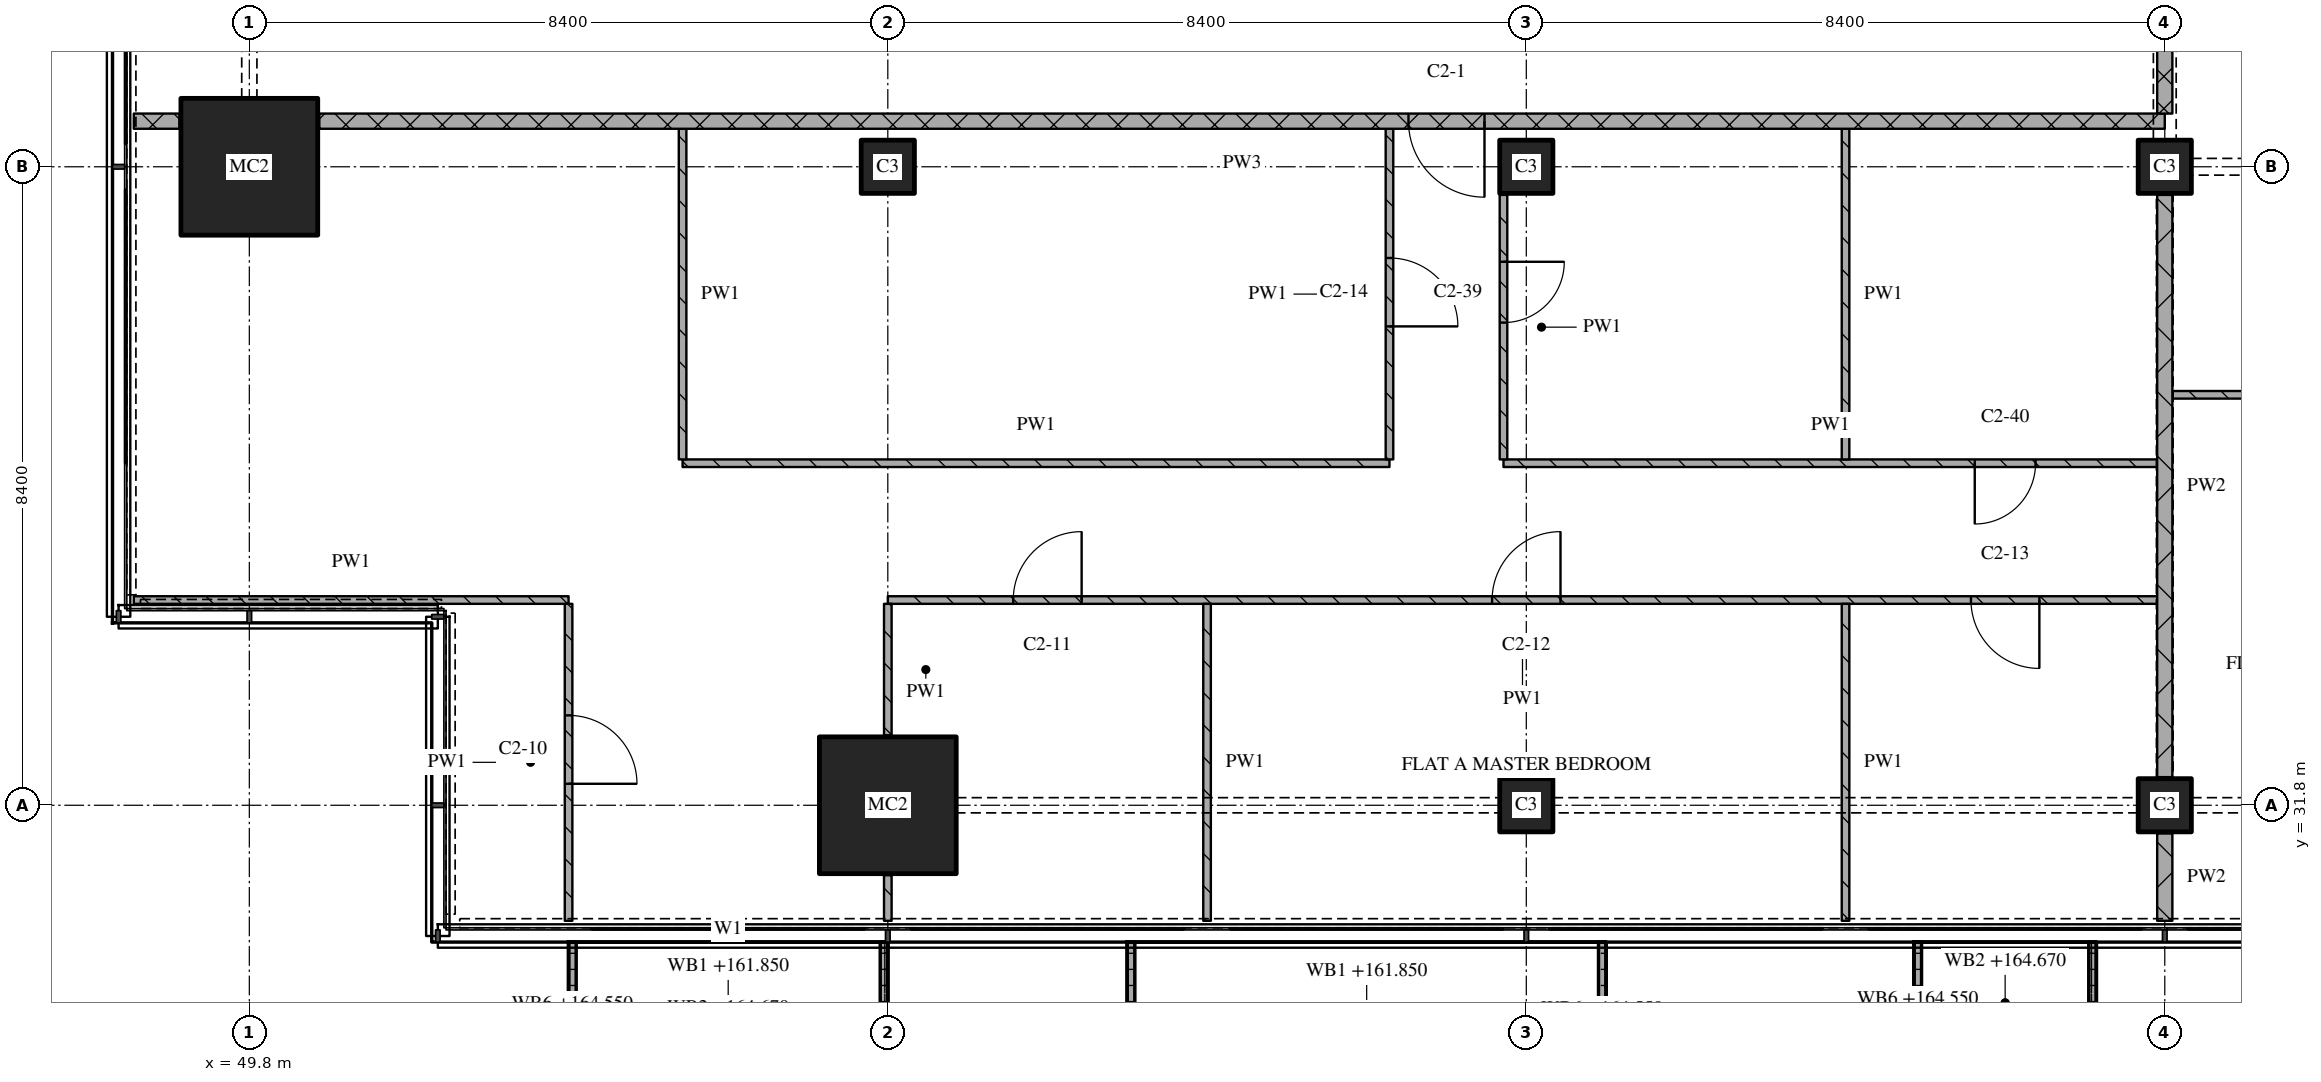
"""IFC4 building model, lengths in metres.
Left out: names, types, materials, properties, quantities, classifications, styles, units other than length and angle.
Written with IfcOpenShell. Run it as: python <this file> out.ifc"""

import sys

from ifc_helpers import new_model, si_unit, direction, frame, frame_2d, origin, origin_2d, place, context, subcontext, project, spatial, polyline, rectangle, outline, extrude, element, fill, save


model = new_model("IFC4")
c1 = context("Model", 3, precision=1e-05, world=origin(), true_north=direction((0.0, 1.0)))
c2 = subcontext(c1, "Body", "Model", "MODEL_VIEW")
j1 = project(units=[si_unit("LENGTHUNIT", "METRE"), si_unit("PLANEANGLEUNIT", "RADIAN")], contexts=[c1])
p1 = place(None, origin())
s1 = spatial("IfcSite", under=j1, at=p1, CompositionType="ELEMENT")
p2 = place(p1, origin())
s2 = spatial("IfcBuilding", under=s1, at=p2, CompositionType="ELEMENT")
p3 = place(p2, frame((0.0, 0.0, 161.85)))
s3 = spatial("IfcBuildingStorey", under=s2, at=p3, CompositionType="ELEMENT", Elevation=161.85)
for number, where, z_axis, x_axis in (
    (1, (49.8, 40.2, 0.0), (0.0, 0.0, 1.0), (1.0, 0.0, 0.0)),
    (2, (58.2, 31.8, 0.0), (0.0, 0.0, 1.0), (1.0, 0.0, 0.0)),
):
    element("IfcColumn", number, at=place(p3, frame(where, z_axis=z_axis, x_axis=x_axis)), inside=s3, PredefinedType="COLUMN", context=c2, shape_type="SweptSolid", body=[
        extrude(rectangle(XDim=1.8, YDim=1.8, at=origin_2d()), origin(), (0.0, 0.0, 1.0), 3.6),
    ])
for number, where, z_axis, x_axis in (
    (3, (58.2, 40.2, 0.0), (0.0, 0.0, 1.0), (1.0, 0.0, 0.0)),
    (4, (66.6, 31.8, 0.0), (0.0, 0.0, 1.0), (1.0, 0.0, 0.0)),
    (5, (66.6, 40.2, 0.0), (0.0, 0.0, 1.0), (1.0, 0.0, 0.0)),
    (6, (75.0, 31.8, 0.0), (0.0, 0.0, 1.0), (1.0, 0.0, 0.0)),
    (7, (75.0, 40.2, 0.0), (0.0, 0.0, 1.0), (1.0, 0.0, 0.0)),
):
    element("IfcColumn", number, at=place(p3, frame(where, z_axis=z_axis, x_axis=x_axis)), inside=s3, PredefinedType="COLUMN", context=c2, shape_type="SweptSolid", body=[
        extrude(rectangle(XDim=0.7, YDim=0.7, at=origin_2d()), origin(), (0.0, 0.0, 1.0), 3.6),
    ])
p4 = place(p3, origin())
e8 = element("IfcWall", 8, at=p4, inside=s3, PredefinedType="SOLIDWALL", context=c2, shape_type="SweptSolid", body=[
    extrude(outline(polyline([(54.0, 30.0), (54.1, 30.0), (54.1, 28.367), (58.1, 28.367), (58.1, 30.0), (58.2, 30.0), (58.2, 28.267), (54.0, 28.267), (54.0, 30.0)])), origin(), (0.0, 0.0, 1.0), 1.0),
])
p5 = place(p3, origin())
e9 = element("IfcWall", 9, at=p5, inside=s3, PredefinedType="SOLIDWALL", context=c2, shape_type="SweptSolid", body=[
    extrude(outline(polyline([(61.35, 30.0), (61.45, 30.0), (61.45, 28.233), (67.55, 28.233), (67.55, 30.0), (67.65, 30.0), (67.65, 28.133), (61.35, 28.133), (61.35, 30.0)])), origin(), (0.0, 0.0, 1.0), 1.0),
])
p6 = place(p3, origin())
e10 = element("IfcWall", 10, at=p6, inside=s3, PredefinedType="SOLIDWALL", context=c2, shape_type="SweptSolid", body=[
    extrude(outline(polyline([(71.7, 30.0), (71.8, 30.0), (71.8, 28.5), (74.0, 28.5), (74.0, 30.0), (74.1, 30.0), (74.1, 28.4), (71.7, 28.4), (71.7, 30.0)])), origin(), (0.0, 0.0, 1.0), 1.0),
])
p7 = place(p3, frame((48.28, 34.5, 0.0), z_axis=(0.0, 0.0, 1.0), x_axis=(1.0, 0.0, 0.0)))
e11 = element("IfcWall", 11, at=p7, inside=s3, PredefinedType="PARTITIONING", context=c2, shape_type="SweptSolid", body=[
    extrude(rectangle(XDim=5.72, YDim=0.1, at=frame_2d((2.86, 0.0))), origin(), (0.0, 0.0, 1.0), 3.32),
])
p8 = place(p3, frame((74.9, 34.5, 0.0), z_axis=(0.0, 0.0, 1.0), x_axis=(-1.0, 0.0, 0.0)))
e12 = element("IfcWall", 12, at=p8, inside=s3, PredefinedType="PARTITIONING", context=c2, shape_type="SweptSolid", body=[
    extrude(rectangle(XDim=16.7, YDim=0.1, at=frame_2d((8.35, 0.0))), origin(), (0.0, 0.0, 1.0), 3.32),
])
p9 = place(p8, frame((1.55, 0.0, 0.0)))
e13 = element("IfcOpeningElement", 13, at=p9, cuts=e12, PredefinedType="OPENING", context=c2, shape_type="SweptSolid", body=[
    extrude(rectangle(XDim=0.9, YDim=2.1, at=frame_2d((0.45, 1.05))), frame((0.0, 0.06, 0.0), z_axis=(0.0, -1.0, 0.0), x_axis=(1.0, 0.0, 0.0)), (0.0, 0.0, 1.0), 0.12),
])
p10 = place(p8, frame((7.85, 0.0, 0.0)))
e14 = element("IfcOpeningElement", 14, at=p10, cuts=e12, PredefinedType="OPENING", context=c2, shape_type="SweptSolid", body=[
    extrude(rectangle(XDim=0.9, YDim=2.1, at=frame_2d((0.45, 1.05))), frame((0.0, 0.06, 0.0), z_axis=(0.0, -1.0, 0.0), x_axis=(1.0, 0.0, 0.0)), (0.0, 0.0, 1.0), 0.12),
])
p11 = place(p8, frame((14.15, 0.0, 0.0)))
e15 = element("IfcOpeningElement", 15, at=p11, cuts=e12, PredefinedType="OPENING", context=c2, shape_type="SweptSolid", body=[
    extrude(rectangle(XDim=0.9, YDim=2.1, at=frame_2d((0.45, 1.05))), frame((0.0, 0.06, 0.0), z_axis=(0.0, -1.0, 0.0), x_axis=(1.0, 0.0, 0.0)), (0.0, 0.0, 1.0), 0.12),
])
p12 = place(p3, frame((55.5, 36.3, 0.0), z_axis=(0.0, 0.0, 1.0), x_axis=(1.0, 0.0, 0.0)))
e16 = element("IfcWall", 16, at=p12, inside=s3, PredefinedType="PARTITIONING", context=c2, shape_type="SweptSolid", body=[
    extrude(rectangle(XDim=9.3, YDim=0.1, at=frame_2d((4.65, 0.0))), origin(), (0.0, 0.0, 1.0), 3.32),
])
p13 = place(p3, frame((66.3, 36.3, 0.0), z_axis=(0.0, 0.0, 1.0), x_axis=(1.0, 0.0, 0.0)))
e17 = element("IfcWall", 17, at=p13, inside=s3, PredefinedType="PARTITIONING", context=c2, shape_type="SweptSolid", body=[
    extrude(rectangle(XDim=8.6, YDim=0.1, at=frame_2d((4.3, 0.0))), origin(), (0.0, 0.0, 1.0), 3.32),
])
p14 = place(p13, frame((6.2, 0.0, 0.0)))
e18 = element("IfcOpeningElement", 18, at=p14, cuts=e17, PredefinedType="OPENING", context=c2, shape_type="SweptSolid", body=[
    extrude(rectangle(XDim=0.8, YDim=2.1, at=frame_2d((0.4, 1.05))), frame((0.0, 0.06, 0.0), z_axis=(0.0, -1.0, 0.0), x_axis=(1.0, 0.0, 0.0)), (0.0, 0.0, 1.0), 0.12),
])
p15 = place(p3, frame((75.1, 37.2, 0.0), z_axis=(0.0, 0.0, 1.0), x_axis=(1.0, 0.0, 0.0)))
e19 = element("IfcWall", 19, at=p15, inside=s3, PredefinedType="PARTITIONING", context=c2, shape_type="SweptSolid", body=[
    extrude(rectangle(XDim=11.3, YDim=0.1, at=frame_2d((5.65, 0.0))), origin(), (0.0, 0.0, 1.0), 3.32),
])
p16 = place(p15, frame((1.708, 0.0, 0.0)))
e20 = element("IfcOpeningElement", 20, at=p16, cuts=e19, PredefinedType="OPENING", context=c2, shape_type="SweptSolid", body=[
    extrude(rectangle(XDim=0.8, YDim=2.1, at=frame_2d((0.4, 1.05))), frame((0.0, 0.06, 0.0), z_axis=(0.0, -1.0, 0.0), x_axis=(1.0, 0.0, 0.0)), (0.0, 0.0, 1.0), 0.12),
])
p17 = place(p15, frame((6.125, 0.0, 0.0)))
e21 = element("IfcOpeningElement", 21, at=p17, cuts=e19, PredefinedType="OPENING", context=c2, shape_type="SweptSolid", body=[
    extrude(rectangle(XDim=0.8, YDim=2.1, at=frame_2d((0.4, 1.05))), frame((0.0, 0.06, 0.0), z_axis=(0.0, -1.0, 0.0), x_axis=(1.0, 0.0, 0.0)), (0.0, 0.0, 1.0), 0.12),
])
p18 = place(p15, frame((9.567, 0.0, 0.0)))
e22 = element("IfcOpeningElement", 22, at=p18, cuts=e19, PredefinedType="OPENING", context=c2, shape_type="SweptSolid", body=[
    extrude(rectangle(XDim=0.9, YDim=2.1, at=frame_2d((0.45, 1.05))), frame((0.0, 0.06, 0.0), z_axis=(0.0, -1.0, 0.0), x_axis=(1.0, 0.0, 0.0)), (0.0, 0.0, 1.0), 0.12),
])
p19 = place(p3, frame((48.28, 40.8, 0.0), z_axis=(0.0, 0.0, 1.0), x_axis=(1.0, 0.0, 0.0)))
e23 = element("IfcWall", 23, at=p19, inside=s3, PredefinedType="PARTITIONING", context=c2, shape_type="SweptSolid", body=[
    extrude(rectangle(XDim=0.6, YDim=0.2, at=frame_2d((0.3, 0.0))), origin(), (0.0, 0.0, 1.0), 3.32),
])
p20 = place(p3, frame((75.0, 40.8, 0.0), z_axis=(0.0, 0.0, 1.0), x_axis=(-1.0, 0.0, 0.0)))
e24 = element("IfcWall", 24, at=p20, inside=s3, PredefinedType="PARTITIONING", context=c2, shape_type="SweptSolid", body=[
    extrude(rectangle(XDim=24.28, YDim=0.2, at=frame_2d((12.14, 0.0))), origin(), (0.0, 0.0, 1.0), 3.32),
])
p21 = place(p20, frame((8.95, 0.0, 0.0)))
e25 = element("IfcOpeningElement", 25, at=p21, cuts=e24, PredefinedType="OPENING", context=c2, shape_type="SweptSolid", body=[
    extrude(rectangle(XDim=1.0, YDim=2.1, at=frame_2d((0.5, 1.05))), frame((0.0, 0.11, 0.0), z_axis=(0.0, -1.0, 0.0), x_axis=(1.0, 0.0, 0.0)), (0.0, 0.0, 1.0), 0.22),
])
p22 = place(p3, frame((54.0, 30.28, 0.0), z_axis=(0.0, 0.0, 1.0), x_axis=(0.0, 1.0, 0.0)))
e26 = element("IfcWall", 26, at=p22, inside=s3, PredefinedType="PARTITIONING", context=c2, shape_type="SweptSolid", body=[
    extrude(rectangle(XDim=4.17, YDim=0.1, at=frame_2d((2.085, 0.0))), origin(), (0.0, 0.0, 1.0), 3.32),
])
p23 = place(p22, frame((1.803, 0.0, 0.0)))
e27 = element("IfcOpeningElement", 27, at=p23, cuts=e26, PredefinedType="OPENING", context=c2, shape_type="SweptSolid", body=[
    extrude(rectangle(XDim=0.9, YDim=2.1, at=frame_2d((0.45, 1.05))), frame((0.0, 0.06, 0.0), z_axis=(0.0, -1.0, 0.0), x_axis=(1.0, 0.0, 0.0)), (0.0, 0.0, 1.0), 0.12),
])
p24 = place(p3, frame((55.5, 40.7, 0.0), z_axis=(0.0, 0.0, 1.0), x_axis=(0.0, -1.0, 0.0)))
e28 = element("IfcWall", 28, at=p24, inside=s3, PredefinedType="PARTITIONING", context=c2, shape_type="SweptSolid", body=[
    extrude(rectangle(XDim=4.35, YDim=0.1, at=frame_2d((2.175, 0.0))), origin(), (0.0, 0.0, 1.0), 3.32),
])
p25 = place(p3, frame((58.2, 30.88, 0.0), z_axis=(0.0, 0.0, 1.0), x_axis=(0.0, -1.0, 0.0)))
e29 = element("IfcWall", 29, at=p25, inside=s3, PredefinedType="PARTITIONING", context=c2, shape_type="SweptSolid", body=[
    extrude(rectangle(XDim=0.6, YDim=0.1, at=frame_2d((0.3, 0.0))), origin(), (0.0, 0.0, 1.0), 3.32),
])
p26 = place(p3, frame((58.2, 34.45, 0.0), z_axis=(0.0, 0.0, 1.0), x_axis=(0.0, -1.0, 0.0)))
e30 = element("IfcWall", 30, at=p26, inside=s3, PredefinedType="PARTITIONING", context=c2, shape_type="SweptSolid", body=[
    extrude(rectangle(XDim=1.73, YDim=0.1, at=frame_2d((0.865, 0.0))), origin(), (0.0, 0.0, 1.0), 3.32),
])
p27 = place(p3, frame((62.4, 34.45, 0.0), z_axis=(0.0, 0.0, 1.0), x_axis=(0.0, -1.0, 0.0)))
e31 = element("IfcWall", 31, at=p27, inside=s3, PredefinedType="PARTITIONING", context=c2, shape_type="SweptSolid", body=[
    extrude(rectangle(XDim=4.17, YDim=0.1, at=frame_2d((2.085, 0.0))), origin(), (0.0, 0.0, 1.0), 3.32),
])
p28 = place(p3, frame((64.8, 36.35, 0.0), z_axis=(0.0, 0.0, 1.0), x_axis=(0.0, 1.0, 0.0)))
e32 = element("IfcWall", 32, at=p28, inside=s3, PredefinedType="PARTITIONING", context=c2, shape_type="SweptSolid", body=[
    extrude(rectangle(XDim=4.35, YDim=0.1, at=frame_2d((2.175, 0.0))), origin(), (0.0, 0.0, 1.0), 3.32),
])
p29 = place(p28, frame((1.75, 0.0, 0.0)))
e33 = element("IfcOpeningElement", 33, at=p29, cuts=e32, PredefinedType="OPENING", context=c2, shape_type="SweptSolid", body=[
    extrude(rectangle(XDim=0.9, YDim=2.1, at=frame_2d((0.45, 1.05))), frame((0.0, 0.06, 0.0), z_axis=(0.0, -1.0, 0.0), x_axis=(1.0, 0.0, 0.0)), (0.0, 0.0, 1.0), 0.12),
])
p30 = place(p3, frame((66.3, 39.83, 0.0), z_axis=(0.0, 0.0, 1.0), x_axis=(0.0, -1.0, 0.0)))
e34 = element("IfcWall", 34, at=p30, inside=s3, PredefinedType="PARTITIONING", context=c2, shape_type="SweptSolid", body=[
    extrude(rectangle(XDim=3.48, YDim=0.1, at=frame_2d((1.74, 0.0))), origin(), (0.0, 0.0, 1.0), 3.32),
])
p31 = place(p30, frame((0.88, 0.0, 0.0)))
e35 = element("IfcOpeningElement", 35, at=p31, cuts=e34, PredefinedType="OPENING", context=c2, shape_type="SweptSolid", body=[
    extrude(rectangle(XDim=0.8, YDim=2.1, at=frame_2d((0.4, 1.05))), frame((0.0, 0.06, 0.0), z_axis=(0.0, -1.0, 0.0), x_axis=(1.0, 0.0, 0.0)), (0.0, 0.0, 1.0), 0.12),
])
p32 = place(p3, frame((70.8, 34.45, 0.0), z_axis=(0.0, 0.0, 1.0), x_axis=(0.0, -1.0, 0.0)))
e36 = element("IfcWall", 36, at=p32, inside=s3, PredefinedType="PARTITIONING", context=c2, shape_type="SweptSolid", body=[
    extrude(rectangle(XDim=4.17, YDim=0.1, at=frame_2d((2.085, 0.0))), origin(), (0.0, 0.0, 1.0), 3.32),
])
p33 = place(p3, frame((70.8, 40.7, 0.0), z_axis=(0.0, 0.0, 1.0), x_axis=(0.0, -1.0, 0.0)))
e37 = element("IfcWall", 37, at=p33, inside=s3, PredefinedType="PARTITIONING", context=c2, shape_type="SweptSolid", body=[
    extrude(rectangle(XDim=4.35, YDim=0.1, at=frame_2d((2.175, 0.0))), origin(), (0.0, 0.0, 1.0), 3.32),
])
p34 = place(p3, frame((75.0, 43.1, 0.0), z_axis=(0.0, 0.0, 1.0), x_axis=(0.0, -1.0, 0.0)))
e38 = element("IfcWall", 38, at=p34, inside=s3, PredefinedType="PARTITIONING", context=c2, shape_type="SweptSolid", body=[
    extrude(rectangle(XDim=2.2, YDim=0.2, at=frame_2d((1.1, 0.0))), origin(), (0.0, 0.0, 1.0), 2.43),
])
p35 = place(p3, frame((75.0, 31.43, 0.0), z_axis=(0.0, 0.0, 1.0), x_axis=(0.0, -1.0, 0.0)))
e39 = element("IfcWall", 39, at=p35, inside=s3, PredefinedType="PARTITIONING", context=c2, shape_type="SweptSolid", body=[
    extrude(rectangle(XDim=1.15, YDim=0.2, at=frame_2d((0.575, 0.0))), origin(), (0.0, 0.0, 1.0), 3.32),
])
p36 = place(p3, frame((75.0, 39.83, 0.0), z_axis=(0.0, 0.0, 1.0), x_axis=(0.0, -1.0, 0.0)))
e40 = element("IfcWall", 40, at=p36, inside=s3, PredefinedType="PARTITIONING", context=c2, shape_type="SweptSolid", body=[
    extrude(rectangle(XDim=7.66, YDim=0.2, at=frame_2d((3.83, 0.0))), origin(), (0.0, 0.0, 1.0), 2.72),
])
p37 = place(p9, origin())
e41 = element("IfcDoor", 41, at=p37, inside=s3, OperationType="SINGLE_SWING_LEFT", PredefinedType="DOOR", context=c2, shape_type="SweptSolid", body=[
    extrude(rectangle(XDim=0.9, YDim=2.1, at=frame_2d((0.45, 1.05))), frame((0.0, 0.025, 0.0), z_axis=(0.0, -1.0, 0.0), x_axis=(1.0, 0.0, 0.0)), (0.0, 0.0, 1.0), 0.05),
])
fill(e13, e41)
p38 = place(p10, origin())
e42 = element("IfcDoor", 42, at=p38, inside=s3, OperationType="SINGLE_SWING_RIGHT", PredefinedType="DOOR", context=c2, shape_type="SweptSolid", body=[
    extrude(rectangle(XDim=0.9, YDim=2.1, at=frame_2d((0.45, 1.05))), frame((0.0, 0.025, 0.0), z_axis=(0.0, -1.0, 0.0), x_axis=(1.0, 0.0, 0.0)), (0.0, 0.0, 1.0), 0.05),
])
fill(e14, e42)
p39 = place(p11, origin())
e43 = element("IfcDoor", 43, at=p39, inside=s3, OperationType="SINGLE_SWING_RIGHT", PredefinedType="DOOR", context=c2, shape_type="SweptSolid", body=[
    extrude(rectangle(XDim=0.9, YDim=2.1, at=frame_2d((0.45, 1.05))), frame((0.0, 0.025, 0.0), z_axis=(0.0, -1.0, 0.0), x_axis=(1.0, 0.0, 0.0)), (0.0, 0.0, 1.0), 0.05),
])
fill(e15, e43)
p40 = place(p14, origin())
e44 = element("IfcDoor", 44, at=p40, inside=s3, OperationType="SINGLE_SWING_RIGHT", PredefinedType="DOOR", context=c2, shape_type="SweptSolid", body=[
    extrude(rectangle(XDim=0.8, YDim=2.1, at=frame_2d((0.4, 1.05))), frame((0.0, 0.025, 0.0), z_axis=(0.0, -1.0, 0.0), x_axis=(1.0, 0.0, 0.0)), (0.0, 0.0, 1.0), 0.05),
])
fill(e18, e44)
p41 = place(p21, origin())
e45 = element("IfcDoor", 45, at=p41, inside=s3, OperationType="SINGLE_SWING_LEFT", PredefinedType="DOOR", context=c2, shape_type="SweptSolid", body=[
    extrude(rectangle(XDim=1.0, YDim=2.1, at=frame_2d((0.5, 1.05))), frame((0.0, 0.025, 0.0), z_axis=(0.0, -1.0, 0.0), x_axis=(1.0, 0.0, 0.0)), (0.0, 0.0, 1.0), 0.05),
])
fill(e25, e45)
p42 = place(p23, origin())
e46 = element("IfcDoor", 46, at=p42, inside=s3, OperationType="SINGLE_SWING_RIGHT", PredefinedType="DOOR", context=c2, shape_type="SweptSolid", body=[
    extrude(rectangle(XDim=0.9, YDim=2.1, at=frame_2d((0.45, 1.05))), frame((0.0, 0.025, 0.0), z_axis=(0.0, -1.0, 0.0), x_axis=(1.0, 0.0, 0.0)), (0.0, 0.0, 1.0), 0.05),
])
fill(e27, e46)
p43 = place(p29, origin())
e47 = element("IfcDoor", 47, at=p43, inside=s3, OperationType="SINGLE_SWING_RIGHT", PredefinedType="DOOR", context=c2, shape_type="SweptSolid", body=[
    extrude(rectangle(XDim=0.9, YDim=2.1, at=frame_2d((0.45, 1.05))), frame((0.0, 0.025, 0.0), z_axis=(0.0, -1.0, 0.0), x_axis=(1.0, 0.0, 0.0)), (0.0, 0.0, 1.0), 0.05),
])
fill(e33, e47)
p44 = place(p31, origin())
e48 = element("IfcDoor", 48, at=p44, inside=s3, OperationType="SINGLE_SWING_LEFT", PredefinedType="DOOR", context=c2, shape_type="SweptSolid", body=[
    extrude(rectangle(XDim=0.8, YDim=2.1, at=frame_2d((0.4, 1.05))), frame((0.0, 0.025, 0.0), z_axis=(0.0, -1.0, 0.0), x_axis=(1.0, 0.0, 0.0)), (0.0, 0.0, 1.0), 0.05),
])
fill(e35, e48)
save(model, sys.argv[1])
